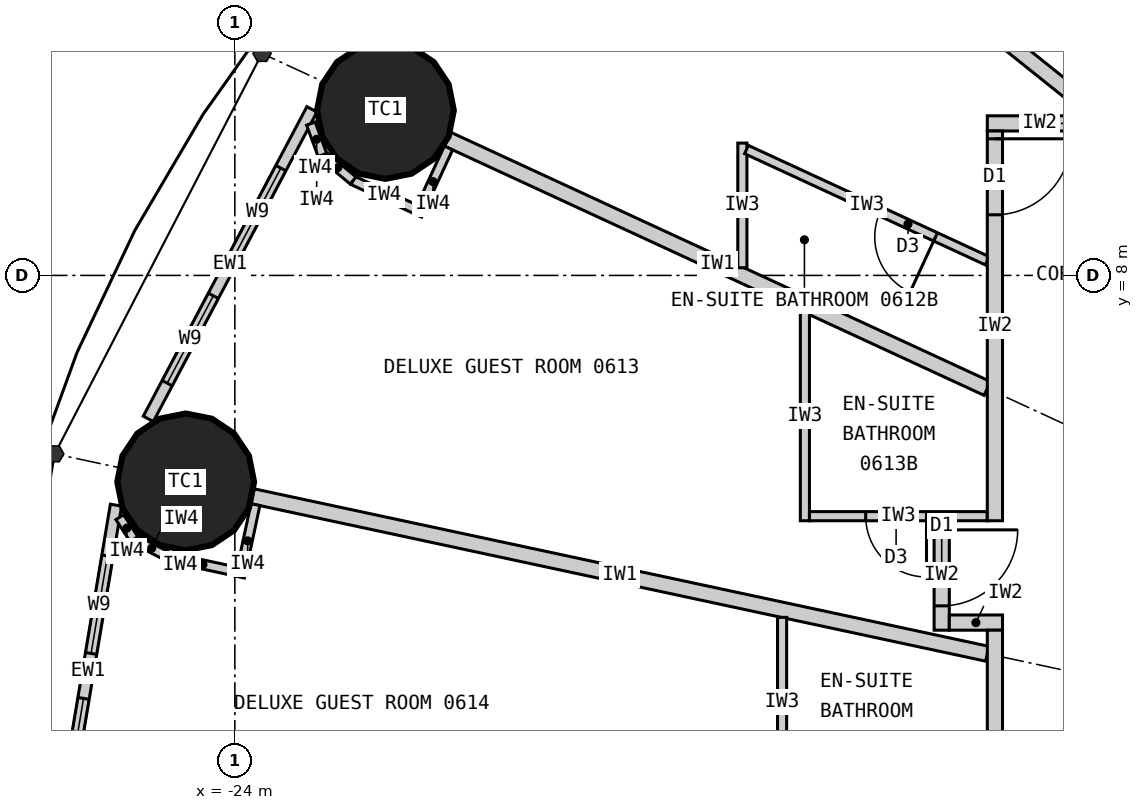
"""IFC4 building model, lengths in metres.
Left out: names, types, materials, properties, quantities, classifications, styles, units other than length and angle.
Written with IfcOpenShell. Run it as: python <this file> out.ifc"""

import sys

from ifc_helpers import new_model, si_unit, direction, frame, frame_2d, origin, origin_2d, place, context, subcontext, project, spatial, rectangle, circle, extrude, element, fill, save


model = new_model("IFC4")
c1 = context("Model", 3, precision=1e-05, world=origin(), true_north=direction((0.0, 1.0)))
c2 = subcontext(c1, "Body", "Model", "MODEL_VIEW")
j1 = project(units=[si_unit("LENGTHUNIT", "METRE"), si_unit("PLANEANGLEUNIT", "RADIAN")], contexts=[c1])
p1 = place(None, origin())
s1 = spatial("IfcSite", under=j1, at=p1, CompositionType="ELEMENT")
p2 = place(p1, origin())
s2 = spatial("IfcBuilding", under=s1, at=p2, CompositionType="ELEMENT")
p3 = place(p2, frame((0.0, 0.0, 32.7)))
s3 = spatial("IfcBuildingStorey", under=s2, at=p3, CompositionType="ELEMENT", Elevation=32.7)
for number, where, z_axis, x_axis in (
    (1, (-22.019, 10.17, 0.0), (0.0, 0.0, 1.0), (1.0, 0.0, 0.0)),
    (2, (-24.647, 5.283, 0.0), (0.0, 0.0, 1.0), (1.0, 0.0, 0.0)),
):
    element("IfcColumn", number, at=place(p3, frame(where, z_axis=z_axis, x_axis=x_axis)), inside=s3, PredefinedType="COLUMN", context=c2, shape_type="SweptSolid", body=[
        extrude(circle(Radius=0.9, at=origin_2d()), origin(), (0.0, 0.0, 1.0), 3.3),
    ])
p4 = place(p3, frame((-22.986, 10.185, 0.0), z_axis=(0.0, 0.0, 1.0), x_axis=(-0.467303182954, -0.884097129959, 0.0)))
e3 = element("IfcWall", 3, at=p4, inside=s3, PredefinedType="ELEMENTEDWALL", context=c2, shape_type="SweptSolid", body=[
    extrude(rectangle(XDim=4.606, YDim=0.15, at=frame_2d((2.303, 0.0))), origin(), (0.0, 0.0, 1.0), 3.12),
])
p5 = place(p4, frame((0.875, 0.0, 0.9)))
e4 = element("IfcOpeningElement", 4, at=p5, cuts=e3, PredefinedType="OPENING", context=c2, shape_type="SweptSolid", body=[
    extrude(rectangle(XDim=1.3, YDim=1.9, at=frame_2d((0.65, 0.95))), frame((0.0, 0.085, 0.0), z_axis=(0.0, -1.0, 0.0), x_axis=(1.0, 0.0, 0.0)), (0.0, 0.0, 1.0), 0.17),
])
p6 = place(p4, frame((2.775, 0.0, 0.9)))
e5 = element("IfcOpeningElement", 5, at=p6, cuts=e3, PredefinedType="OPENING", context=c2, shape_type="SweptSolid", body=[
    extrude(rectangle(XDim=1.3, YDim=1.9, at=frame_2d((0.65, 0.95))), frame((0.0, 0.085, 0.0), z_axis=(0.0, -1.0, 0.0), x_axis=(1.0, 0.0, 0.0)), (0.0, 0.0, 1.0), 0.17),
])
p7 = place(p3, frame((-25.564, 4.978, 0.0), z_axis=(0.0, 0.0, 1.0), x_axis=(-0.165641751141, -0.986185991727, 0.0)))
e6 = element("IfcWall", 6, at=p7, inside=s3, PredefinedType="ELEMENTEDWALL", context=c2, shape_type="SweptSolid", body=[
    extrude(rectangle(XDim=4.428, YDim=0.15, at=frame_2d((2.214, 0.0))), origin(), (0.0, 0.0, 1.0), 3.12),
])
p8 = place(p7, frame((0.678, 0.0, 0.9)))
e7 = element("IfcOpeningElement", 7, at=p8, cuts=e6, PredefinedType="OPENING", context=c2, shape_type="SweptSolid", body=[
    extrude(rectangle(XDim=1.3, YDim=1.9, at=frame_2d((0.65, 0.95))), frame((0.0, 0.085, 0.0), z_axis=(0.0, -1.0, 0.0), x_axis=(1.0, 0.0, 0.0)), (0.0, 0.0, 1.0), 0.17),
])
p9 = place(p7, frame((2.578, 0.0, 0.9)))
e8 = element("IfcOpeningElement", 8, at=p9, cuts=e6, PredefinedType="OPENING", context=c2, shape_type="SweptSolid", body=[
    extrude(rectangle(XDim=1.3, YDim=1.9, at=frame_2d((0.65, 0.95))), frame((0.0, 0.085, 0.0), z_axis=(0.0, -1.0, 0.0), x_axis=(1.0, 0.0, 0.0)), (0.0, 0.0, 1.0), 0.17),
])
p10 = place(p3, frame((-12.625, 10.1, 0.0), z_axis=(0.0, 0.0, 1.0), x_axis=(-0.780872884676, 0.624689953479, 0.0)))
e9 = element("IfcWall", 9, at=p10, inside=s3, PredefinedType="PARTITIONING", context=c2, shape_type="SweptSolid", body=[
    extrude(rectangle(XDim=5.845, YDim=0.2, at=frame_2d((2.922, 0.0))), origin(), (0.0, 0.0, 1.0), 2.32),
])
p11 = place(p3, frame((-14.1, 6.512, 0.0), z_axis=(0.0, 0.0, 1.0), x_axis=(-0.907842433118, 0.41931147925, 0.0)))
e10 = element("IfcWall", 10, at=p11, inside=s3, PredefinedType="PARTITIONING", context=c2, shape_type="SweptSolid", body=[
    extrude(rectangle(XDim=7.823, YDim=0.2, at=frame_2d((3.912, 0.0))), origin(), (0.0, 0.0, 1.0), 2.32),
])
p12 = place(p3, frame((-14.1, 3.022, 0.0), z_axis=(0.0, 0.0, 1.0), x_axis=(-0.977786510688, 0.209603290805, 0.0)))
e11 = element("IfcWall", 11, at=p12, inside=s3, PredefinedType="PARTITIONING", context=c2, shape_type="SweptSolid", body=[
    extrude(rectangle(XDim=9.887, YDim=0.2, at=frame_2d((4.943, 0.0))), origin(), (0.0, 0.0, 1.0), 2.32),
])
p13 = place(p3, frame((-17.323, 8.101, 0.0), z_axis=(0.0, 0.0, 1.0), x_axis=(0.0, 1.0, 0.0)))
e12 = element("IfcWall", 12, at=p13, inside=s3, PredefinedType="PARTITIONING", context=c2, shape_type="SweptSolid", body=[
    extrude(rectangle(XDim=1.64, YDim=0.12, at=frame_2d((0.82, 0.0))), origin(), (0.0, 0.0, 1.0), 3.12),
])
p14 = place(p3, frame((-14.1, 8.193, 0.0), z_axis=(0.0, 0.0, 1.0), x_axis=(-0.907836493557, 0.419324338628, 0.0)))
e13 = element("IfcWall", 13, at=p14, inside=s3, PredefinedType="PARTITIONING", context=c2, shape_type="SweptSolid", body=[
    extrude(rectangle(XDim=3.49, YDim=0.12, at=frame_2d((1.745, 0.0))), origin(), (0.0, 0.0, 1.0), 3.12),
])
p15 = place(p14, frame((0.75, 0.0, 0.0)))
e14 = element("IfcOpeningElement", 14, at=p15, cuts=e13, PredefinedType="OPENING", context=c2, shape_type="SweptSolid", body=[
    extrude(rectangle(XDim=0.8, YDim=2.1, at=frame_2d((0.4, 1.05))), frame((0.0, 0.07, 0.0), z_axis=(0.0, -1.0, 0.0), x_axis=(1.0, 0.0, 0.0)), (0.0, 0.0, 1.0), 0.14),
])
p16 = place(p3, frame((-16.5, 7.521, 0.0), z_axis=(0.0, 0.0, 1.0), x_axis=(0.0, -1.0, 0.0)))
e15 = element("IfcWall", 15, at=p16, inside=s3, PredefinedType="PARTITIONING", context=c2, shape_type="SweptSolid", body=[
    extrude(rectangle(XDim=2.749, YDim=0.12, at=frame_2d((1.374, 0.0))), origin(), (0.0, 0.0, 1.0), 3.12),
])
p17 = place(p3, frame((-14.1, 4.833, 0.0), z_axis=(0.0, 0.0, 1.0), x_axis=(-1.0, 0.0, 0.0)))
e16 = element("IfcWall", 16, at=p17, inside=s3, PredefinedType="PARTITIONING", context=c2, shape_type="SweptSolid", body=[
    extrude(rectangle(XDim=2.34, YDim=0.12, at=frame_2d((1.17, 0.0))), origin(), (0.0, 0.0, 1.0), 3.12),
])
p18 = place(p17, frame((0.8, 0.0, 0.0)))
e17 = element("IfcOpeningElement", 17, at=p18, cuts=e16, PredefinedType="OPENING", context=c2, shape_type="SweptSolid", body=[
    extrude(rectangle(XDim=0.8, YDim=2.1, at=frame_2d((0.4, 1.05))), frame((0.0, 0.07, 0.0), z_axis=(0.0, -1.0, 0.0), x_axis=(1.0, 0.0, 0.0)), (0.0, 0.0, 1.0), 0.14),
])
p19 = place(p3, frame((-16.8, 3.501, 0.0), z_axis=(0.0, 0.0, 1.0), x_axis=(0.0, -1.0, 0.0)))
e18 = element("IfcWall", 18, at=p19, inside=s3, PredefinedType="PARTITIONING", context=c2, shape_type="SweptSolid", body=[
    extrude(rectangle(XDim=2.219, YDim=0.12, at=frame_2d((1.109, 0.0))), origin(), (0.0, 0.0, 1.0), 3.12),
])
p20 = place(p3, frame((-14.7, 4.772, 0.0), z_axis=(0.0, 0.0, 1.0), x_axis=(0.0, -1.0, 0.0)))
e19 = element("IfcWall", 19, at=p20, inside=s3, PredefinedType="PARTITIONING", context=c2, shape_type="SweptSolid", body=[
    extrude(rectangle(XDim=1.44, YDim=0.2, at=frame_2d((0.72, 0.0))), origin(), (0.0, 0.0, 1.0), 3.12),
])
p21 = place(p20, frame((0.12, 0.0, 0.0)))
e20 = element("IfcOpeningElement", 20, at=p21, cuts=e19, PredefinedType="OPENING", context=c2, shape_type="SweptSolid", body=[
    extrude(rectangle(XDim=1.0, YDim=2.2, at=frame_2d((0.5, 1.1))), frame((0.0, 0.11, 0.0), z_axis=(0.0, -1.0, 0.0), x_axis=(1.0, 0.0, 0.0)), (0.0, 0.0, 1.0), 0.22),
])
p22 = place(p3, frame((-13.9, 3.433, 0.0), z_axis=(0.0, 0.0, 1.0), x_axis=(-1.0, 0.0, 0.0)))
e21 = element("IfcWall", 21, at=p22, inside=s3, PredefinedType="PARTITIONING", context=c2, shape_type="SweptSolid", body=[
    extrude(rectangle(XDim=0.7, YDim=0.2, at=frame_2d((0.35, 0.0))), origin(), (0.0, 0.0, 1.0), 2.32),
])
p23 = place(p3, frame((-14.1, 10.0, 0.0), z_axis=(0.0, 0.0, 1.0), x_axis=(1.0, 0.0, 0.0)))
e22 = element("IfcWall", 22, at=p23, inside=s3, PredefinedType="PARTITIONING", context=c2, shape_type="SweptSolid", body=[
    extrude(rectangle(XDim=2.481, YDim=0.2, at=frame_2d((1.24, 0.0))), origin(), (0.0, 0.0, 1.0), 3.12),
])
p24 = place(p3, frame((-14.0, 9.9, 0.0), z_axis=(0.0, 0.0, 1.0), x_axis=(0.0, -1.0, 0.0)))
e23 = element("IfcWall", 23, at=p24, inside=s3, PredefinedType="PARTITIONING", context=c2, shape_type="SweptSolid", body=[
    extrude(rectangle(XDim=5.127, YDim=0.2, at=frame_2d((2.564, 0.0))), origin(), (0.0, 0.0, 1.0), 3.12),
])
p25 = place(p24, frame((0.103, 0.0, 0.0)))
e24 = element("IfcOpeningElement", 24, at=p25, cuts=e23, PredefinedType="OPENING", context=c2, shape_type="SweptSolid", body=[
    extrude(rectangle(XDim=1.0, YDim=2.2, at=frame_2d((0.5, 1.1))), frame((0.0, 0.11, 0.0), z_axis=(0.0, -1.0, 0.0), x_axis=(1.0, 0.0, 0.0)), (0.0, 0.0, 1.0), 0.22),
])
p26 = place(p3, frame((-14.0, 3.333, 0.0), z_axis=(0.0, 0.0, 1.0), x_axis=(0.0, -1.0, 0.0)))
e25 = element("IfcWall", 25, at=p26, inside=s3, PredefinedType="PARTITIONING", context=c2, shape_type="SweptSolid", body=[
    extrude(rectangle(XDim=6.665, YDim=0.2, at=frame_2d((3.333, 0.0))), origin(), (0.0, 0.0, 1.0), 3.12),
])
p27 = place(p26, frame((2.15, 0.0, 0.0)))
e26 = element("IfcOpeningElement", 26, at=p27, cuts=e25, PredefinedType="OPENING", context=c2, shape_type="SweptSolid", body=[
    extrude(rectangle(XDim=1.0, YDim=2.2, at=frame_2d((0.5, 1.1))), frame((0.0, 0.11, 0.0), z_axis=(0.0, -1.0, 0.0), x_axis=(1.0, 0.0, 0.0)), (0.0, 0.0, 1.0), 0.22),
])
p28 = place(p26, frame((5.173, 0.0, 0.0)))
e27 = element("IfcOpeningElement", 27, at=p28, cuts=e25, PredefinedType="OPENING", context=c2, shape_type="SweptSolid", body=[
    extrude(rectangle(XDim=1.0, YDim=2.2, at=frame_2d((0.5, 1.1))), frame((0.0, 0.11, 0.0), z_axis=(0.0, -1.0, 0.0), x_axis=(1.0, 0.0, 0.0)), (0.0, 0.0, 1.0), 0.22),
])
p29 = place(p3, frame((-21.189, 9.677, 0.0), z_axis=(0.0, 0.0, 1.0), x_axis=(-0.419344098106, -0.907827366509, 0.0)))
e28 = element("IfcWall", 28, at=p29, inside=s3, PredefinedType="PARTITIONING", context=c2, shape_type="SweptSolid", body=[
    extrude(rectangle(XDim=0.975, YDim=0.12, at=frame_2d((0.487, 0.0))), origin(), (0.0, 0.0, 1.0), 3.12),
])
p30 = place(p3, frame((-21.627, 8.872, 0.0), z_axis=(0.0, 0.0, 1.0), x_axis=(-0.907935564339, 0.419109783957, 0.0)))
e29 = element("IfcWall", 29, at=p30, inside=s3, PredefinedType="PARTITIONING", context=c2, shape_type="SweptSolid", body=[
    extrude(rectangle(XDim=0.9, YDim=0.12, at=frame_2d((0.45, 0.0))), origin(), (0.0, 0.0, 1.0), 3.12),
])
p31 = place(p3, frame((-22.445, 9.249, 0.0), z_axis=(0.0, 0.0, 1.0), x_axis=(-0.768335565584, 0.640047231584, 0.0)))
e30 = element("IfcWall", 30, at=p31, inside=s3, PredefinedType="PARTITIONING", context=c2, shape_type="SweptSolid", body=[
    extrude(rectangle(XDim=0.525, YDim=0.12, at=frame_2d((0.263, 0.0))), origin(), (0.0, 0.0, 1.0), 3.12),
])
p32 = place(p3, frame((-22.848, 9.585, 0.0), z_axis=(0.0, 0.0, 1.0), x_axis=(-0.345267312673, 0.938504386138, 0.0)))
e31 = element("IfcWall", 31, at=p32, inside=s3, PredefinedType="PARTITIONING", context=c2, shape_type="SweptSolid", body=[
    extrude(rectangle(XDim=0.439, YDim=0.12, at=frame_2d((0.22, 0.0))), origin(), (0.0, 0.0, 1.0), 3.12),
])
p33 = place(p3, frame((-23.729, 4.984, 0.0), z_axis=(0.0, 0.0, 1.0), x_axis=(-0.20968306268, -0.977769406979, 0.0)))
e32 = element("IfcWall", 32, at=p33, inside=s3, PredefinedType="PARTITIONING", context=c2, shape_type="SweptSolid", body=[
    extrude(rectangle(XDim=0.975, YDim=0.12, at=frame_2d((0.487, 0.0))), origin(), (0.0, 0.0, 1.0), 3.12),
])
p34 = place(p3, frame((-23.98, 4.103, 0.0), z_axis=(0.0, 0.0, 1.0), x_axis=(-0.977762694187, 0.209714362543, 0.0)))
e33 = element("IfcWall", 33, at=p34, inside=s3, PredefinedType="PARTITIONING", context=c2, shape_type="SweptSolid", body=[
    extrude(rectangle(XDim=0.9, YDim=0.12, at=frame_2d((0.45, 0.0))), origin(), (0.0, 0.0, 1.0), 3.12),
])
p35 = place(p3, frame((-24.86, 4.291, 0.0), z_axis=(0.0, 0.0, 1.0), x_axis=(-0.890204323062, 0.455561481254, 0.0)))
e34 = element("IfcWall", 34, at=p35, inside=s3, PredefinedType="PARTITIONING", context=c2, shape_type="SweptSolid", body=[
    extrude(rectangle(XDim=0.525, YDim=0.12, at=frame_2d((0.263, 0.0))), origin(), (0.0, 0.0, 1.0), 3.12),
])
p36 = place(p3, frame((-25.327, 4.531, 0.0), z_axis=(0.0, 0.0, 1.0), x_axis=(-0.543516034791, 0.839398784801, 0.0)))
e35 = element("IfcWall", 35, at=p36, inside=s3, PredefinedType="PARTITIONING", context=c2, shape_type="SweptSolid", body=[
    extrude(rectangle(XDim=0.344, YDim=0.12, at=frame_2d((0.172, 0.0))), origin(), (0.0, 0.0, 1.0), 3.12),
])
p37 = place(p5, origin())
e36 = element("IfcWindow", 36, at=p37, inside=s3, PartitioningType="SINGLE_PANEL", PredefinedType="WINDOW", context=c2, shape_type="SweptSolid", body=[
    extrude(rectangle(XDim=1.3, YDim=1.9, at=frame_2d((0.65, 0.95))), frame((0.0, 0.03, 0.0), z_axis=(0.0, -1.0, 0.0), x_axis=(1.0, 0.0, 0.0)), (0.0, 0.0, 1.0), 0.06),
])
fill(e4, e36)
p38 = place(p6, origin())
e37 = element("IfcWindow", 37, at=p38, inside=s3, PartitioningType="SINGLE_PANEL", PredefinedType="WINDOW", context=c2, shape_type="SweptSolid", body=[
    extrude(rectangle(XDim=1.3, YDim=1.9, at=frame_2d((0.65, 0.95))), frame((0.0, 0.03, 0.0), z_axis=(0.0, -1.0, 0.0), x_axis=(1.0, 0.0, 0.0)), (0.0, 0.0, 1.0), 0.06),
])
fill(e5, e37)
p39 = place(p8, origin())
e38 = element("IfcWindow", 38, at=p39, inside=s3, PartitioningType="SINGLE_PANEL", PredefinedType="WINDOW", context=c2, shape_type="SweptSolid", body=[
    extrude(rectangle(XDim=1.3, YDim=1.9, at=frame_2d((0.65, 0.95))), frame((0.0, 0.03, 0.0), z_axis=(0.0, -1.0, 0.0), x_axis=(1.0, 0.0, 0.0)), (0.0, 0.0, 1.0), 0.06),
])
fill(e7, e38)
p40 = place(p9, origin())
e39 = element("IfcWindow", 39, at=p40, inside=s3, PartitioningType="SINGLE_PANEL", PredefinedType="WINDOW", context=c2, shape_type="SweptSolid", body=[
    extrude(rectangle(XDim=1.3, YDim=1.9, at=frame_2d((0.65, 0.95))), frame((0.0, 0.03, 0.0), z_axis=(0.0, -1.0, 0.0), x_axis=(1.0, 0.0, 0.0)), (0.0, 0.0, 1.0), 0.06),
])
fill(e8, e39)
p41 = place(p15, origin())
e40 = element("IfcDoor", 40, at=p41, inside=s3, OperationType="SINGLE_SWING_LEFT", PredefinedType="DOOR", context=c2, shape_type="SweptSolid", body=[
    extrude(rectangle(XDim=0.8, YDim=2.1, at=frame_2d((0.4, 1.05))), frame((0.0, 0.025, 0.0), z_axis=(0.0, -1.0, 0.0), x_axis=(1.0, 0.0, 0.0)), (0.0, 0.0, 1.0), 0.05),
])
fill(e14, e40)
p42 = place(p25, origin())
e41 = element("IfcDoor", 41, at=p42, inside=s3, OperationType="SINGLE_SWING_LEFT", PredefinedType="DOOR", context=c2, shape_type="SweptSolid", body=[
    extrude(rectangle(XDim=1.0, YDim=2.2, at=frame_2d((0.5, 1.1))), frame((0.0, 0.025, 0.0), z_axis=(0.0, -1.0, 0.0), x_axis=(1.0, 0.0, 0.0)), (0.0, 0.0, 1.0), 0.05),
])
fill(e24, e41)
p43 = place(p18, origin())
e42 = element("IfcDoor", 42, at=p43, inside=s3, OperationType="SINGLE_SWING_LEFT", PredefinedType="DOOR", context=c2, shape_type="SweptSolid", body=[
    extrude(rectangle(XDim=0.8, YDim=2.1, at=frame_2d((0.4, 1.05))), frame((0.0, 0.025, 0.0), z_axis=(0.0, -1.0, 0.0), x_axis=(1.0, 0.0, 0.0)), (0.0, 0.0, 1.0), 0.05),
])
fill(e17, e42)
p44 = place(p21, origin())
e43 = element("IfcDoor", 43, at=p44, inside=s3, OperationType="SINGLE_SWING_LEFT", PredefinedType="DOOR", context=c2, shape_type="SweptSolid", body=[
    extrude(rectangle(XDim=1.0, YDim=2.2, at=frame_2d((0.5, 1.1))), frame((0.0, 0.025, 0.0), z_axis=(0.0, -1.0, 0.0), x_axis=(1.0, 0.0, 0.0)), (0.0, 0.0, 1.0), 0.05),
])
fill(e20, e43)
save(model, sys.argv[1])
